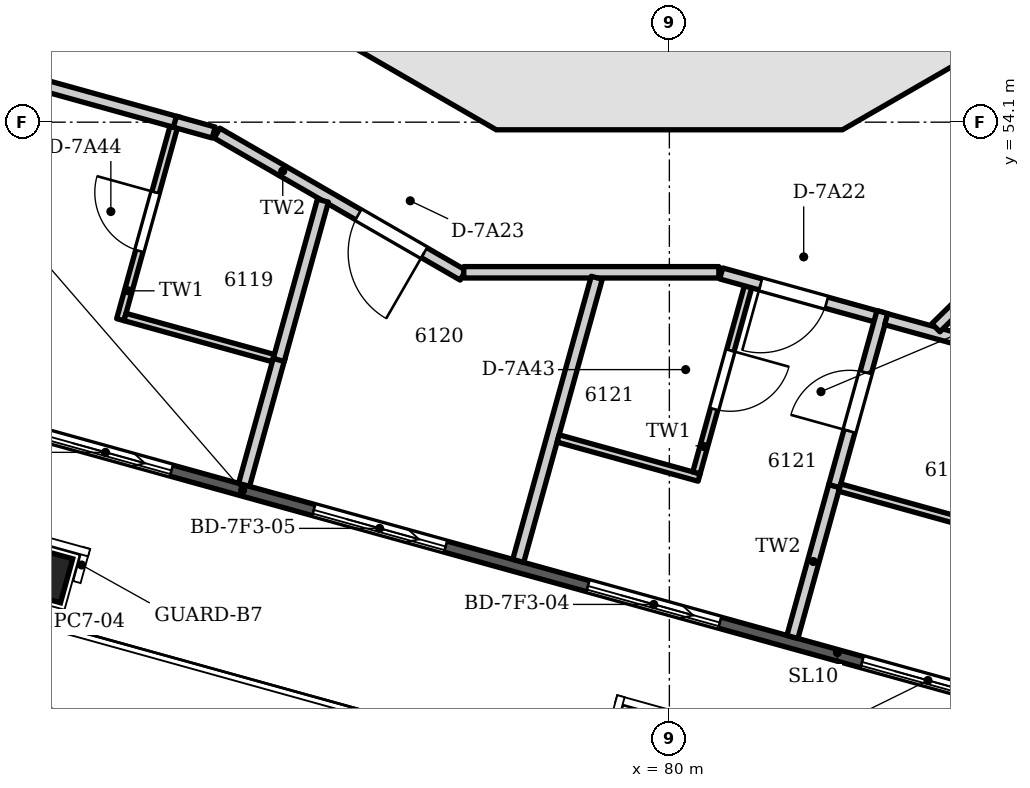
"""IFC4 building model, lengths in metres.
Left out: names, types, materials, properties, quantities, classifications, styles, units other than length and angle.
Written with IfcOpenShell. Run it as: python <this file> out.ifc"""

import sys

from ifc_helpers import new_model, si_unit, direction, frame, frame_2d, origin, origin_2d, place, context, subcontext, project, spatial, polyline, rectangle, outline, extrude, element, fill, save


model = new_model("IFC4")
c1 = context("Model", 3, precision=1e-05, world=origin(), true_north=direction((0.0, 1.0)))
c2 = subcontext(c1, "Body", "Model", "MODEL_VIEW")
j1 = project(units=[si_unit("LENGTHUNIT", "METRE"), si_unit("PLANEANGLEUNIT", "RADIAN")], contexts=[c1])
p1 = place(None, origin())
s1 = spatial("IfcSite", under=j1, at=p1, CompositionType="ELEMENT")
p2 = place(p1, origin())
s2 = spatial("IfcBuilding", under=s1, at=p2, CompositionType="ELEMENT")
p3 = place(p2, frame((0.0, 0.0, 234.9)))
s3 = spatial("IfcBuildingStorey", under=s2, at=p3, CompositionType="ELEMENT", Elevation=234.9)
p4 = place(p3, frame((73.952, 56.581, 0.0), z_axis=(0.0, 0.0, 1.0), x_axis=(0.866034756103, -0.499983800959, 0.0)))
e1 = element("IfcWall", 1, at=p4, inside=s3, PredefinedType="SHEAR", context=c2, shape_type="SweptSolid", body=[
    extrude(outline(polyline([(0.0, -0.35), (4.555, -0.35), (4.368, 0.35), (0.188, 0.35), (0.0, -0.35)])), origin(), (0.0, 0.0, 1.0), 3.6),
])
p5 = place(p3, frame((77.722, 54.35, 0.0), z_axis=(0.0, 0.0, 1.0), x_axis=(1.0, 0.0, 0.0)))
e2 = element("IfcWall", 2, at=p5, inside=s3, PredefinedType="SHEAR", context=c2, shape_type="SweptSolid", body=[
    extrude(outline(polyline([(0.0, -0.35), (4.555, -0.35), (4.368, 0.35), (0.188, 0.35), (0.0, -0.35)])), origin(), (0.0, 0.0, 1.0), 3.6),
])
p6 = place(p5, frame((1.278, 0.0, 0.0)))
e3 = element("IfcOpeningElement", 3, at=p6, cuts=e2, PredefinedType="OPENING", context=c2, shape_type="SweptSolid", body=[
    extrude(rectangle(XDim=2.0, YDim=2.1, at=frame_2d((1.0, 1.05))), frame((0.0, 0.36, 0.0), z_axis=(0.0, -1.0, 0.0), x_axis=(1.0, 0.0, 0.0)), (0.0, 0.0, 1.0), 0.72),
])
p7 = place(p3, frame((82.103, 54.303, 0.0), z_axis=(0.0, 0.0, 1.0), x_axis=(0.866034756103, 0.499983800959, 0.0)))
e4 = element("IfcWall", 4, at=p7, inside=s3, PredefinedType="SHEAR", context=c2, shape_type="SweptSolid", body=[
    extrude(outline(polyline([(0.0, -0.35), (4.555, -0.35), (4.368, 0.35), (0.188, 0.35), (0.0, -0.35)])), origin(), (0.0, 0.0, 1.0), 3.6),
])
p8 = place(p3, frame((78.85, 59.1, 0.0), z_axis=(0.0, 0.0, 1.0), x_axis=(0.0, -1.0, 0.0)))
e5 = element("IfcWall", 5, at=p8, inside=s3, PredefinedType="SHEAR", context=c2, shape_type="SweptSolid", body=[
    extrude(rectangle(XDim=4.4, YDim=0.3, at=frame_2d((2.2, 0.0))), origin(), (0.0, 0.0, 1.0), 3.6),
])
p9 = place(p8, frame((1.3, 0.0, 0.0)))
e6 = element("IfcOpeningElement", 6, at=p9, cuts=e5, PredefinedType="OPENING", context=c2, shape_type="SweptSolid", body=[
    extrude(rectangle(XDim=1.1, YDim=2.1, at=frame_2d((0.55, 1.05))), frame((0.0, 0.16, 0.0), z_axis=(0.0, -1.0, 0.0), x_axis=(1.0, 0.0, 0.0)), (0.0, 0.0, 1.0), 0.32),
])
p10 = place(p3, frame((81.15, 59.1, 0.0), z_axis=(0.0, 0.0, 1.0), x_axis=(0.0, -1.0, 0.0)))
e7 = element("IfcWall", 7, at=p10, inside=s3, PredefinedType="SHEAR", context=c2, shape_type="SweptSolid", body=[
    extrude(rectangle(XDim=4.4, YDim=0.3, at=frame_2d((2.2, 0.0))), origin(), (0.0, 0.0, 1.0), 3.6),
])
p11 = place(p10, frame((1.3, 0.0, 0.0)))
e8 = element("IfcOpeningElement", 8, at=p11, cuts=e7, PredefinedType="OPENING", context=c2, shape_type="SweptSolid", body=[
    extrude(rectangle(XDim=1.1, YDim=2.1, at=frame_2d((0.55, 1.05))), frame((0.0, 0.16, 0.0), z_axis=(0.0, -1.0, 0.0), x_axis=(1.0, 0.0, 0.0)), (0.0, 0.0, 1.0), 0.32),
])
p12 = place(p3, frame((71.733, 48.16, -0.35), z_axis=(0.0, 0.0, 1.0), x_axis=(-0.963630453209, 0.267238376078, 0.0)))
e9 = element("IfcColumn", 9, at=p12, inside=s3, PredefinedType="COLUMN", context=c2, shape_type="SweptSolid", body=[
    extrude(rectangle(XDim=0.7, YDim=0.6, at=origin_2d()), origin(), (0.0, 0.0, 1.0), 3.95),
])
p13 = place(p3, frame((92.419, 44.255, 0.0), z_axis=(0.0, 0.0, 1.0), x_axis=(-0.963630586427, 0.267237895708, 0.0)))
e10 = element("IfcWall", 10, at=p13, inside=s3, PredefinedType="SOLIDWALL", context=c2, shape_type="SweptSolid", body=[
    extrude(outline(polyline([(0.149, 0.075), (0.149, -0.075), (33.537, -0.075), (33.537, 0.075), (0.149, 0.075)])), origin(), (0.0, 0.0, 1.0), 3.3),
])
p14 = place(p13, frame((1.171, 0.0, 0.0)))
e11 = element("IfcOpeningElement", 11, at=p14, cuts=e10, PredefinedType="OPENING", context=c2, shape_type="SweptSolid", body=[
    extrude(rectangle(XDim=1.8, YDim=2.6, at=frame_2d((0.9, 1.3))), frame((0.0, 0.085, 0.0), z_axis=(0.0, -1.0, 0.0), x_axis=(1.0, 0.0, 0.0)), (0.0, 0.0, 1.0), 0.17),
])
p15 = place(p13, frame((4.714, 0.0, 0.0)))
e12 = element("IfcOpeningElement", 12, at=p15, cuts=e10, PredefinedType="OPENING", context=c2, shape_type="SweptSolid", body=[
    extrude(rectangle(XDim=1.8, YDim=2.6, at=frame_2d((0.9, 1.3))), frame((0.0, 0.085, 0.0), z_axis=(0.0, -1.0, 0.0), x_axis=(1.0, 0.0, 0.0)), (0.0, 0.0, 1.0), 0.17),
])
p16 = place(p13, frame((8.457, 0.0, 0.0)))
e13 = element("IfcOpeningElement", 13, at=p16, cuts=e10, PredefinedType="OPENING", context=c2, shape_type="SweptSolid", body=[
    extrude(rectangle(XDim=1.8, YDim=2.6, at=frame_2d((0.9, 1.3))), frame((0.0, 0.085, 0.0), z_axis=(0.0, -1.0, 0.0), x_axis=(1.0, 0.0, 0.0)), (0.0, 0.0, 1.0), 0.17),
])
p17 = place(p13, frame((12.2, 0.0, 0.0)))
e14 = element("IfcOpeningElement", 14, at=p17, cuts=e10, PredefinedType="OPENING", context=c2, shape_type="SweptSolid", body=[
    extrude(rectangle(XDim=1.8, YDim=2.6, at=frame_2d((0.9, 1.3))), frame((0.0, 0.085, 0.0), z_axis=(0.0, -1.0, 0.0), x_axis=(1.0, 0.0, 0.0)), (0.0, 0.0, 1.0), 0.17),
])
p18 = place(p13, frame((15.943, 0.0, 0.0)))
e15 = element("IfcOpeningElement", 15, at=p18, cuts=e10, PredefinedType="OPENING", context=c2, shape_type="SweptSolid", body=[
    extrude(rectangle(XDim=1.8, YDim=2.6, at=frame_2d((0.9, 1.3))), frame((0.0, 0.085, 0.0), z_axis=(0.0, -1.0, 0.0), x_axis=(1.0, 0.0, 0.0)), (0.0, 0.0, 1.0), 0.17),
])
p19 = place(p13, frame((19.686, 0.0, 0.0)))
e16 = element("IfcOpeningElement", 16, at=p19, cuts=e10, PredefinedType="OPENING", context=c2, shape_type="SweptSolid", body=[
    extrude(rectangle(XDim=1.8, YDim=2.6, at=frame_2d((0.9, 1.3))), frame((0.0, 0.085, 0.0), z_axis=(0.0, -1.0, 0.0), x_axis=(1.0, 0.0, 0.0)), (0.0, 0.0, 1.0), 0.17),
])
p20 = place(p13, frame((23.429, 0.0, 0.0)))
e17 = element("IfcOpeningElement", 17, at=p20, cuts=e10, PredefinedType="OPENING", context=c2, shape_type="SweptSolid", body=[
    extrude(rectangle(XDim=1.8, YDim=2.6, at=frame_2d((0.9, 1.3))), frame((0.0, 0.085, 0.0), z_axis=(0.0, -1.0, 0.0), x_axis=(1.0, 0.0, 0.0)), (0.0, 0.0, 1.0), 0.17),
])
p21 = place(p13, frame((27.172, 0.0, 0.0)))
e18 = element("IfcOpeningElement", 18, at=p21, cuts=e10, PredefinedType="OPENING", context=c2, shape_type="SweptSolid", body=[
    extrude(rectangle(XDim=1.8, YDim=2.6, at=frame_2d((0.9, 1.3))), frame((0.0, 0.085, 0.0), z_axis=(0.0, -1.0, 0.0), x_axis=(1.0, 0.0, 0.0)), (0.0, 0.0, 1.0), 0.17),
])
p22 = place(p13, frame((30.715, 0.0, 0.0)))
e19 = element("IfcOpeningElement", 19, at=p22, cuts=e10, PredefinedType="OPENING", context=c2, shape_type="SweptSolid", body=[
    extrude(rectangle(XDim=1.8, YDim=2.6, at=frame_2d((0.9, 1.3))), frame((0.0, 0.085, 0.0), z_axis=(0.0, -1.0, 0.0), x_axis=(1.0, 0.0, 0.0)), (0.0, 0.0, 1.0), 0.17),
])
p23 = place(p3, origin())
e20 = element("IfcWall", 20, at=p23, inside=s3, PredefinedType="PARAPET", context=c2, shape_type="SweptSolid", body=[
    extrude(outline(polyline([(59.388, 50.961), (96.326, 36.411), (96.275, 36.753), (62.154, 50.194), (59.388, 50.961)])), origin(), (0.0, 0.0, 1.0), 1.1),
])
p24 = place(p3, frame((61.043, 57.559, 0.0), z_axis=(0.0, 0.0, 1.0), x_axis=(0.963630739332, -0.26723734435, 0.0)))
e21 = element("IfcWall", 21, at=p24, inside=s3, PredefinedType="PARTITIONING", context=c2, shape_type="SweptSolid", body=[
    extrude(rectangle(XDim=12.979, YDim=0.15, at=frame_2d((6.49, 0.0))), origin(), (0.0, 0.0, 1.0), 2.75),
])
p25 = place(p24, frame((7.74, 0.0, 0.0)))
e22 = element("IfcOpeningElement", 22, at=p25, cuts=e21, PredefinedType="OPENING", context=c2, shape_type="SweptSolid", body=[
    extrude(rectangle(XDim=0.9, YDim=2.1, at=frame_2d((0.45, 1.05))), frame((0.0, 0.085, 0.0), z_axis=(0.0, -1.0, 0.0), x_axis=(1.0, 0.0, 0.0)), (0.0, 0.0, 1.0), 0.17),
])
p26 = place(p24, frame((6.44, 0.0, 0.0)))
e23 = element("IfcOpeningElement", 23, at=p26, cuts=e21, PredefinedType="OPENING", context=c2, shape_type="SweptSolid", body=[
    extrude(rectangle(XDim=1.0, YDim=2.1, at=frame_2d((0.5, 1.05))), frame((0.0, 0.085, 0.0), z_axis=(0.0, -1.0, 0.0), x_axis=(1.0, 0.0, 0.0)), (0.0, 0.0, 1.0), 0.17),
])
p27 = place(p3, frame((72.777, 51.502, 0.0), z_axis=(0.0, 0.0, 1.0), x_axis=(0.267159430854, 0.963652343175, 0.0)))
e24 = element("IfcWall", 24, at=p27, inside=s3, PredefinedType="PARTITIONING", context=c2, shape_type="SweptSolid", body=[
    extrude(rectangle(XDim=2.625, YDim=0.1, at=frame_2d((1.313, 0.0))), origin(), (0.0, 0.0, 1.0), 3.3),
])
p28 = place(p27, frame((0.938, 0.0, 0.0)))
e25 = element("IfcOpeningElement", 25, at=p28, cuts=e24, PredefinedType="OPENING", context=c2, shape_type="SweptSolid", body=[
    extrude(rectangle(XDim=0.8, YDim=2.1, at=frame_2d((0.4, 1.05))), frame((0.0, 0.06, 0.0), z_axis=(0.0, -1.0, 0.0), x_axis=(1.0, 0.0, 0.0)), (0.0, 0.0, 1.0), 0.12),
])
p29 = place(p3, frame((72.838, 51.537, 0.0), z_axis=(0.0, 0.0, 1.0), x_axis=(0.963721434873, -0.266910089668, 0.0)))
e26 = element("IfcWall", 26, at=p29, inside=s3, PredefinedType="PARTITIONING", context=c2, shape_type="SweptSolid", body=[
    extrude(rectangle(XDim=2.025, YDim=0.1, at=frame_2d((1.013, 0.0))), origin(), (0.0, 0.0, 1.0), 3.3),
])
p30 = place(p3, frame((73.495, 54.106, 0.0), z_axis=(0.0, 0.0, 1.0), x_axis=(0.963398829282, -0.268072183819, 0.0)))
e27 = element("IfcWall", 27, at=p30, inside=s3, PredefinedType="PARTITIONING", context=c2, shape_type="SweptSolid", body=[
    extrude(rectangle(XDim=0.529, YDim=0.15, at=frame_2d((0.265, 0.0))), origin(), (0.0, 0.0, 1.0), 3.3),
])
p31 = place(p3, frame((74.049, 53.956, 0.0), z_axis=(0.0, 0.0, 1.0), x_axis=(0.865974487503, -0.500088179218, 0.0)))
e28 = element("IfcWall", 28, at=p31, inside=s3, PredefinedType="PARTITIONING", context=c2, shape_type="SweptSolid", body=[
    extrude(rectangle(XDim=3.737, YDim=0.15, at=frame_2d((1.868, 0.0))), origin(), (0.0, 0.0, 1.0), 3.3),
])
p32 = place(p31, frame((2.147, 0.0, 0.0)))
e29 = element("IfcOpeningElement", 29, at=p32, cuts=e28, PredefinedType="OPENING", context=c2, shape_type="SweptSolid", body=[
    extrude(rectangle(XDim=1.0, YDim=2.1, at=frame_2d((0.5, 1.05))), frame((0.0, 0.085, 0.0), z_axis=(0.0, -1.0, 0.0), x_axis=(1.0, 0.0, 0.0)), (0.0, 0.0, 1.0), 0.17),
])
p33 = place(p3, frame((74.405, 49.329, 0.0), z_axis=(0.0, 0.0, 1.0), x_axis=(0.267401148385, 0.963585297648, 0.0)))
e30 = element("IfcWall", 30, at=p33, inside=s3, PredefinedType="PARTITIONING", context=c2, shape_type="SweptSolid", body=[
    extrude(rectangle(XDim=1.764, YDim=0.15, at=frame_2d((0.882, 0.0))), origin(), (0.0, 0.0, 1.0), 3.3),
])
p34 = place(p3, frame((74.861, 50.972, 0.0), z_axis=(0.0, 0.0, 1.0), x_axis=(0.267076384881, 0.963675362681, 0.0)))
e31 = element("IfcWall", 31, at=p34, inside=s3, PredefinedType="PARTITIONING", context=c2, shape_type="SweptSolid", body=[
    extrude(rectangle(XDim=2.175, YDim=0.15, at=frame_2d((1.087, 0.0))), origin(), (0.0, 0.0, 1.0), 3.3),
])
p35 = place(p3, frame((77.295, 52.125, 0.0), z_axis=(0.0, 0.0, 1.0), x_axis=(1.0, 0.0, 0.0)))
e32 = element("IfcWall", 32, at=p35, inside=s3, PredefinedType="PARTITIONING", context=c2, shape_type="SweptSolid", body=[
    extrude(rectangle(XDim=3.356, YDim=0.15, at=frame_2d((1.678, 0.0))), origin(), (0.0, 0.0, 1.0), 3.3),
])
p36 = place(p3, frame((78.012, 48.329, 0.0), z_axis=(0.0, 0.0, 1.0), x_axis=(0.267337590954, 0.963602932988, 0.0)))
e33 = element("IfcWall", 33, at=p36, inside=s3, PredefinedType="PARTITIONING", context=c2, shape_type="SweptSolid", body=[
    extrude(rectangle(XDim=3.865, YDim=0.15, at=frame_2d((1.932, 0.0))), origin(), (0.0, 0.0, 1.0), 3.3),
])
p37 = place(p3, frame((78.536, 49.939, 0.0), z_axis=(0.0, 0.0, 1.0), x_axis=(0.963625049046, -0.267257862095, 0.0)))
e34 = element("IfcWall", 34, at=p37, inside=s3, PredefinedType="PARTITIONING", context=c2, shape_type="SweptSolid", body=[
    extrude(rectangle(XDim=1.925, YDim=0.1, at=frame_2d((0.962, 0.0))), origin(), (0.0, 0.0, 1.0), 3.3),
])
p38 = place(p3, frame((80.356, 49.486, 0.0), z_axis=(0.0, 0.0, 1.0), x_axis=(0.267267405356, 0.963622402207, 0.0)))
e35 = element("IfcWall", 35, at=p38, inside=s3, PredefinedType="PARTITIONING", context=c2, shape_type="SweptSolid", body=[
    extrude(rectangle(XDim=2.542, YDim=0.1, at=frame_2d((1.271, 0.0))), origin(), (0.0, 0.0, 1.0), 3.3),
])
p39 = place(p38, frame((0.871, 0.0, 0.0)))
e36 = element("IfcOpeningElement", 36, at=p39, cuts=e35, PredefinedType="OPENING", context=c2, shape_type="SweptSolid", body=[
    extrude(rectangle(XDim=0.8, YDim=2.1, at=frame_2d((0.4, 1.05))), frame((0.0, 0.06, 0.0), z_axis=(0.0, -1.0, 0.0), x_axis=(1.0, 0.0, 0.0)), (0.0, 0.0, 1.0), 0.12),
])
p40 = place(p3, frame((80.682, 52.11, 0.0), z_axis=(0.0, 0.0, 1.0), x_axis=(0.96358351927, -0.267407556722, 0.0)))
e37 = element("IfcWall", 37, at=p40, inside=s3, PredefinedType="PARTITIONING", context=c2, shape_type="SweptSolid", body=[
    extrude(rectangle(XDim=2.185, YDim=0.15, at=frame_2d((1.092, 0.0))), origin(), (0.0, 0.0, 1.0), 3.3),
])
p41 = place(p40, frame((0.538, 0.0, 0.0)))
e38 = element("IfcOpeningElement", 38, at=p41, cuts=e37, PredefinedType="OPENING", context=c2, shape_type="SweptSolid", body=[
    extrude(rectangle(XDim=0.9, YDim=2.1, at=frame_2d((0.45, 1.05))), frame((0.0, 0.085, 0.0), z_axis=(0.0, -1.0, 0.0), x_axis=(1.0, 0.0, 0.0)), (0.0, 0.0, 1.0), 0.17),
])
p42 = place(p3, frame((81.619, 47.327, 0.0), z_axis=(0.0, 0.0, 1.0), x_axis=(0.267075474737, 0.963675614921, 0.0)))
e39 = element("IfcWall", 39, at=p42, inside=s3, PredefinedType="PARTITIONING", context=c2, shape_type="SweptSolid", body=[
    extrude(rectangle(XDim=2.061, YDim=0.15, at=frame_2d((1.03, 0.0))), origin(), (0.0, 0.0, 1.0), 3.3),
])
p43 = place(p3, frame((82.169, 49.313, 0.0), z_axis=(0.0, 0.0, 1.0), x_axis=(0.267490099625, 0.963560608681, 0.0)))
e40 = element("IfcWall", 40, at=p43, inside=s3, PredefinedType="PARTITIONING", context=c2, shape_type="SweptSolid", body=[
    extrude(rectangle(XDim=2.375, YDim=0.15, at=frame_2d((1.188, 0.0))), origin(), (0.0, 0.0, 1.0), 3.3),
])
p44 = place(p43, frame((0.75, 0.0, 0.0)))
e41 = element("IfcOpeningElement", 41, at=p44, cuts=e40, PredefinedType="OPENING", context=c2, shape_type="SweptSolid", body=[
    extrude(rectangle(XDim=0.8, YDim=2.1, at=frame_2d((0.4, 1.05))), frame((0.0, 0.085, 0.0), z_axis=(0.0, -1.0, 0.0), x_axis=(1.0, 0.0, 0.0)), (0.0, 0.0, 1.0), 0.17),
])
p45 = place(p3, frame((82.241, 49.293, 0.0), z_axis=(0.0, 0.0, 1.0), x_axis=(0.963634107358, -0.26722519929, 0.0)))
e42 = element("IfcWall", 42, at=p45, inside=s3, PredefinedType="PARTITIONING", context=c2, shape_type="SweptSolid", body=[
    extrude(rectangle(XDim=1.925, YDim=0.1, at=frame_2d((0.962, 0.0))), origin(), (0.0, 0.0, 1.0), 3.3),
])
p46 = place(p3, frame((82.852, 51.508, 0.0), z_axis=(0.0, 0.0, 1.0), x_axis=(0.963942160186, -0.266111840805, 0.0)))
e43 = element("IfcWall", 43, at=p46, inside=s3, PredefinedType="PARTITIONING", context=c2, shape_type="SweptSolid", body=[
    extrude(rectangle(XDim=1.883, YDim=0.15, at=frame_2d((0.941, 0.0))), origin(), (0.0, 0.0, 1.0), 3.3),
])
p47 = place(p3, frame((83.507, 51.396, 0.0), z_axis=(0.0, 0.0, 1.0), x_axis=(0.712824796749, 0.701342148412, 0.0)))
e44 = element("IfcWall", 44, at=p47, inside=s3, PredefinedType="PARTITIONING", context=c2, shape_type="SweptSolid", body=[
    extrude(rectangle(XDim=2.169, YDim=0.15, at=frame_2d((1.084, 0.0))), origin(), (0.0, 0.0, 1.0), 3.3),
])
p48 = place(p16, origin())
e45 = element("IfcDoor", 45, at=p48, inside=s3, OperationType="SLIDING_TO_LEFT", PredefinedType="DOOR", context=c2, shape_type="SweptSolid", body=[
    extrude(rectangle(XDim=1.8, YDim=2.6, at=frame_2d((0.9, 1.3))), frame((0.0, 0.025, 0.0), z_axis=(0.0, -1.0, 0.0), x_axis=(1.0, 0.0, 0.0)), (0.0, 0.0, 1.0), 0.05),
])
fill(e13, e45)
p49 = place(p17, origin())
e46 = element("IfcDoor", 46, at=p49, inside=s3, OperationType="SLIDING_TO_LEFT", PredefinedType="DOOR", context=c2, shape_type="SweptSolid", body=[
    extrude(rectangle(XDim=1.8, YDim=2.6, at=frame_2d((0.9, 1.3))), frame((0.0, 0.025, 0.0), z_axis=(0.0, -1.0, 0.0), x_axis=(1.0, 0.0, 0.0)), (0.0, 0.0, 1.0), 0.05),
])
fill(e14, e46)
p50 = place(p18, origin())
e47 = element("IfcDoor", 47, at=p50, inside=s3, OperationType="SLIDING_TO_LEFT", PredefinedType="DOOR", context=c2, shape_type="SweptSolid", body=[
    extrude(rectangle(XDim=1.8, YDim=2.6, at=frame_2d((0.9, 1.3))), frame((0.0, 0.025, 0.0), z_axis=(0.0, -1.0, 0.0), x_axis=(1.0, 0.0, 0.0)), (0.0, 0.0, 1.0), 0.05),
])
fill(e15, e47)
p51 = place(p19, origin())
e48 = element("IfcDoor", 48, at=p51, inside=s3, OperationType="SLIDING_TO_LEFT", PredefinedType="DOOR", context=c2, shape_type="SweptSolid", body=[
    extrude(rectangle(XDim=1.8, YDim=2.6, at=frame_2d((0.9, 1.3))), frame((0.0, 0.025, 0.0), z_axis=(0.0, -1.0, 0.0), x_axis=(1.0, 0.0, 0.0)), (0.0, 0.0, 1.0), 0.05),
])
fill(e16, e48)
p52 = place(p41, frame((0.9, 0.0, 0.0), z_axis=(0.0, 0.0, 1.0), x_axis=(-1.0, 0.0, 0.0)))
e49 = element("IfcDoor", 49, at=p52, inside=s3, OperationType="SINGLE_SWING_RIGHT", PredefinedType="DOOR", context=c2, shape_type="SweptSolid", body=[
    extrude(rectangle(XDim=0.9, YDim=2.1, at=frame_2d((0.45, 1.05))), frame((0.0, 0.025, 0.0), z_axis=(0.0, -1.0, 0.0), x_axis=(1.0, 0.0, 0.0)), (0.0, 0.0, 1.0), 0.05),
])
fill(e38, e49)
p53 = place(p32, frame((1.0, 0.0, 0.0), z_axis=(0.0, 0.0, 1.0), x_axis=(-1.0, 0.0, 0.0)))
e50 = element("IfcDoor", 50, at=p53, inside=s3, OperationType="SINGLE_SWING_LEFT", PredefinedType="DOOR", context=c2, shape_type="SweptSolid", body=[
    extrude(rectangle(XDim=1.0, YDim=2.1, at=frame_2d((0.5, 1.05))), frame((0.0, 0.025, 0.0), z_axis=(0.0, -1.0, 0.0), x_axis=(1.0, 0.0, 0.0)), (0.0, 0.0, 1.0), 0.05),
])
fill(e29, e50)
p54 = place(p44, origin())
e51 = element("IfcDoor", 51, at=p54, inside=s3, OperationType="SINGLE_SWING_LEFT", PredefinedType="DOOR", context=c2, shape_type="SweptSolid", body=[
    extrude(rectangle(XDim=0.8, YDim=2.1, at=frame_2d((0.4, 1.05))), frame((0.0, 0.025, 0.0), z_axis=(0.0, -1.0, 0.0), x_axis=(1.0, 0.0, 0.0)), (0.0, 0.0, 1.0), 0.05),
])
fill(e41, e51)
p55 = place(p39, frame((0.8, 0.0, 0.0), z_axis=(0.0, 0.0, 1.0), x_axis=(-1.0, 0.0, 0.0)))
e52 = element("IfcDoor", 52, at=p55, inside=s3, OperationType="SINGLE_SWING_LEFT", PredefinedType="DOOR", context=c2, shape_type="SweptSolid", body=[
    extrude(rectangle(XDim=0.8, YDim=2.1, at=frame_2d((0.4, 1.05))), frame((0.0, 0.025, 0.0), z_axis=(0.0, -1.0, 0.0), x_axis=(1.0, 0.0, 0.0)), (0.0, 0.0, 1.0), 0.05),
])
fill(e36, e52)
p56 = place(p28, origin())
e53 = element("IfcDoor", 53, at=p56, inside=s3, OperationType="SINGLE_SWING_RIGHT", PredefinedType="DOOR", context=c2, shape_type="SweptSolid", body=[
    extrude(rectangle(XDim=0.8, YDim=2.1, at=frame_2d((0.4, 1.05))), frame((0.0, 0.025, 0.0), z_axis=(0.0, -1.0, 0.0), x_axis=(1.0, 0.0, 0.0)), (0.0, 0.0, 1.0), 0.05),
])
fill(e25, e53)
p57 = place(p6, origin())
e54 = element("IfcDoor", 54, at=p57, inside=s3, OperationType="DOUBLE_DOOR_SINGLE_SWING", PredefinedType="DOOR", context=c2, shape_type="SweptSolid", body=[
    extrude(rectangle(XDim=2.0, YDim=2.1, at=frame_2d((1.0, 1.05))), frame((0.0, 0.025, 0.0), z_axis=(0.0, -1.0, 0.0), x_axis=(1.0, 0.0, 0.0)), (0.0, 0.0, 1.0), 0.05),
])
fill(e3, e54)
save(model, sys.argv[1])
